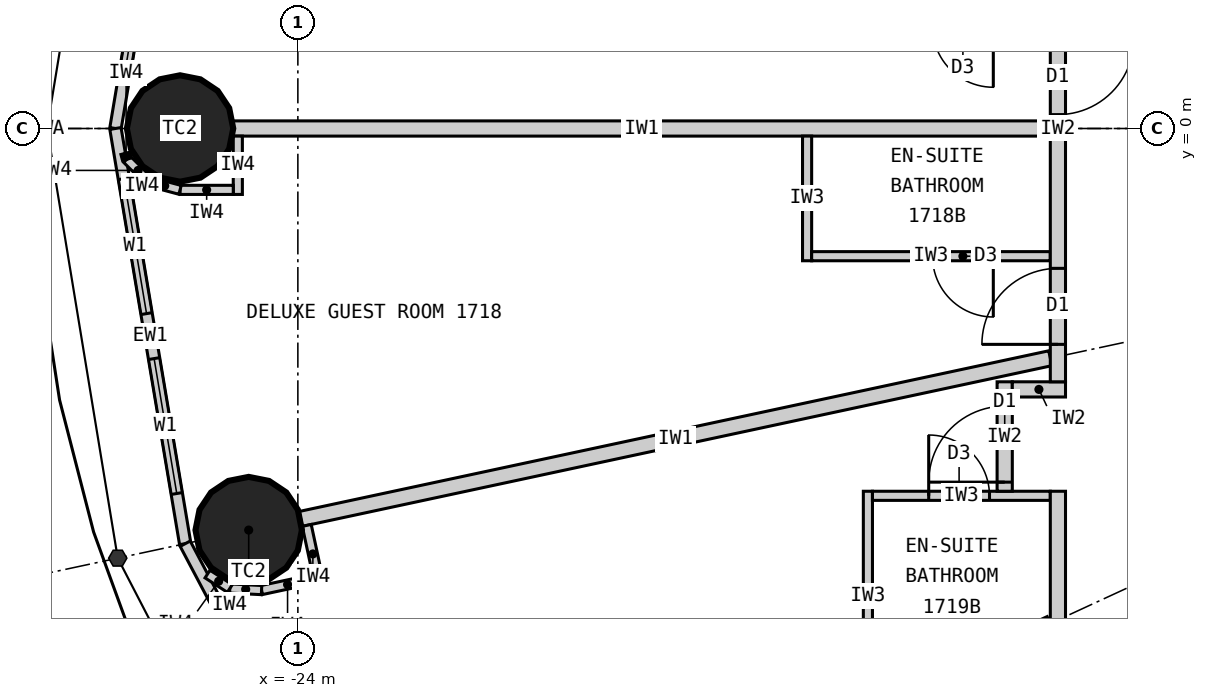
"""IFC4 building model, lengths in metres.
Left out: names, types, materials, properties, quantities, classifications, styles, units other than length and angle.
Written with IfcOpenShell. Run it as: python <this file> out.ifc"""

import sys

from ifc_helpers import new_model, si_unit, direction, frame, frame_2d, origin, origin_2d, place, context, subcontext, project, spatial, rectangle, circle, extrude, element, fill, save


model = new_model("IFC4")
c1 = context("Model", 3, precision=1e-05, world=origin(), true_north=direction((0.0, 1.0)))
c2 = subcontext(c1, "Body", "Model", "MODEL_VIEW")
j1 = project(units=[si_unit("LENGTHUNIT", "METRE"), si_unit("PLANEANGLEUNIT", "RADIAN")], contexts=[c1])
p1 = place(None, origin())
s1 = spatial("IfcSite", under=j1, at=p1, CompositionType="ELEMENT")
p2 = place(p1, origin())
s2 = spatial("IfcBuilding", under=s1, at=p2, CompositionType="ELEMENT")
p3 = place(p2, frame((0.0, 0.0, 70.5)))
s3 = spatial("IfcBuildingStorey", under=s2, at=p3, CompositionType="ELEMENT", Elevation=70.5)
for number, where, z_axis, x_axis in (
    (1, (-25.55, 0.0, 0.0), (0.0, 0.0, 1.0), (1.0, 0.0, 0.0)),
    (2, (-24.647, -5.283, 0.0), (0.0, 0.0, 1.0), (1.0, 0.0, 0.0)),
):
    element("IfcColumn", number, at=place(p3, frame(where, z_axis=z_axis, x_axis=x_axis)), inside=s3, PredefinedType="COLUMN", context=c2, shape_type="SweptSolid", body=[
        extrude(circle(Radius=0.7, at=origin_2d()), origin(), (0.0, 0.0, 1.0), 3.3),
    ])
p4 = place(p3, frame((-25.482, 5.462, 0.0), z_axis=(0.0, 0.0, 1.0), x_axis=(-0.165642551694, -0.986185857264, 0.0)))
e3 = element("IfcWall", 3, at=p4, inside=s3, PredefinedType="ELEMENTEDWALL", context=c2, shape_type="SweptSolid", body=[
    extrude(rectangle(XDim=5.539, YDim=0.15, at=frame_2d((2.77, 0.0))), origin(), (0.0, 0.0, 1.0), 3.12),
])
p5 = place(p4, frame((0.669, 0.0, 0.9)))
e4 = element("IfcOpeningElement", 4, at=p5, cuts=e3, PredefinedType="OPENING", context=c2, shape_type="SweptSolid", body=[
    extrude(rectangle(XDim=1.8, YDim=1.9, at=frame_2d((0.9, 0.95))), frame((0.0, 0.085, 0.0), z_axis=(0.0, -1.0, 0.0), x_axis=(1.0, 0.0, 0.0)), (0.0, 0.0, 1.0), 0.17),
])
p6 = place(p4, frame((3.07, 0.0, 0.9)))
e5 = element("IfcOpeningElement", 5, at=p6, cuts=e3, PredefinedType="OPENING", context=c2, shape_type="SweptSolid", body=[
    extrude(rectangle(XDim=1.8, YDim=1.9, at=frame_2d((0.9, 0.95))), frame((0.0, 0.085, 0.0), z_axis=(0.0, -1.0, 0.0), x_axis=(1.0, 0.0, 0.0)), (0.0, 0.0, 1.0), 0.17),
])
p7 = place(p3, frame((-26.4, 0.0, 0.0), z_axis=(0.0, 0.0, 1.0), x_axis=(0.165642551694, -0.986185857264, 0.0)))
e6 = element("IfcWall", 6, at=p7, inside=s3, PredefinedType="ELEMENTEDWALL", context=c2, shape_type="SweptSolid", body=[
    extrude(rectangle(XDim=5.539, YDim=0.15, at=frame_2d((2.77, 0.0))), origin(), (0.0, 0.0, 1.0), 3.12),
])
p8 = place(p7, frame((0.669, 0.0, 0.9)))
e7 = element("IfcOpeningElement", 7, at=p8, cuts=e6, PredefinedType="OPENING", context=c2, shape_type="SweptSolid", body=[
    extrude(rectangle(XDim=1.8, YDim=1.9, at=frame_2d((0.9, 0.95))), frame((0.0, 0.085, 0.0), z_axis=(0.0, -1.0, 0.0), x_axis=(1.0, 0.0, 0.0)), (0.0, 0.0, 1.0), 0.17),
])
p9 = place(p7, frame((3.07, 0.0, 0.9)))
e8 = element("IfcOpeningElement", 8, at=p9, cuts=e6, PredefinedType="OPENING", context=c2, shape_type="SweptSolid", body=[
    extrude(rectangle(XDim=1.8, YDim=1.9, at=frame_2d((0.9, 0.95))), frame((0.0, 0.085, 0.0), z_axis=(0.0, -1.0, 0.0), x_axis=(1.0, 0.0, 0.0)), (0.0, 0.0, 1.0), 0.17),
])
p10 = place(p3, frame((-25.482, -5.462, 0.0), z_axis=(0.0, 0.0, 1.0), x_axis=(0.467296867008, -0.884100468321, 0.0)))
e9 = element("IfcWall", 9, at=p10, inside=s3, PredefinedType="ELEMENTEDWALL", context=c2, shape_type="SweptSolid", body=[
    extrude(rectangle(XDim=5.734, YDim=0.15, at=frame_2d((2.867, 0.0))), origin(), (0.0, 0.0, 1.0), 3.12),
])
p11 = place(p10, frame((0.767, 0.0, 0.9)))
e10 = element("IfcOpeningElement", 10, at=p11, cuts=e9, PredefinedType="OPENING", context=c2, shape_type="SweptSolid", body=[
    extrude(rectangle(XDim=1.8, YDim=1.9, at=frame_2d((0.9, 0.95))), frame((0.0, 0.085, 0.0), z_axis=(0.0, -1.0, 0.0), x_axis=(1.0, 0.0, 0.0)), (0.0, 0.0, 1.0), 0.17),
])
p12 = place(p10, frame((3.167, 0.0, 0.9)))
e11 = element("IfcOpeningElement", 11, at=p12, cuts=e9, PredefinedType="OPENING", context=c2, shape_type="SweptSolid", body=[
    extrude(rectangle(XDim=1.8, YDim=1.9, at=frame_2d((0.9, 0.95))), frame((0.0, 0.085, 0.0), z_axis=(0.0, -1.0, 0.0), x_axis=(1.0, 0.0, 0.0)), (0.0, 0.0, 1.0), 0.17),
])
p13 = place(p3, frame((-14.1, 0.0, 0.0), z_axis=(0.0, 0.0, 1.0), x_axis=(-1.0, 0.0, 0.0)))
e12 = element("IfcWall", 12, at=p13, inside=s3, PredefinedType="PARTITIONING", context=c2, shape_type="SweptSolid", body=[
    extrude(rectangle(XDim=10.75, YDim=0.2, at=frame_2d((5.375, 0.0))), origin(), (0.0, 0.0, 1.0), 2.27),
])
p14 = place(p3, frame((-14.1, -3.022, 0.0), z_axis=(0.0, 0.0, 1.0), x_axis=(-0.977790014929, -0.209586943072, 0.0)))
e13 = element("IfcWall", 13, at=p14, inside=s3, PredefinedType="PARTITIONING", context=c2, shape_type="SweptSolid", body=[
    extrude(rectangle(XDim=10.087, YDim=0.2, at=frame_2d((5.043, 0.0))), origin(), (0.0, 0.0, 1.0), 2.32),
])
p15 = place(p3, frame((-14.1, -6.512, 0.0), z_axis=(0.0, 0.0, 1.0), x_axis=(-0.907832871056, -0.419332181247, 0.0)))
e14 = element("IfcWall", 14, at=p15, inside=s3, PredefinedType="PARTITIONING", context=c2, shape_type="SweptSolid", body=[
    extrude(rectangle(XDim=8.023, YDim=0.2, at=frame_2d((4.011, 0.0))), origin(), (0.0, 0.0, 1.0), 2.32),
])
p16 = place(p3, frame((-17.3, -0.1, 0.0), z_axis=(0.0, 0.0, 1.0), x_axis=(0.0, -1.0, 0.0)))
e15 = element("IfcWall", 15, at=p16, inside=s3, PredefinedType="PARTITIONING", context=c2, shape_type="SweptSolid", body=[
    extrude(rectangle(XDim=1.64, YDim=0.12, at=frame_2d((0.82, 0.0))), origin(), (0.0, 0.0, 1.0), 3.12),
])
p17 = place(p3, frame((-14.1, -1.68, 0.0), z_axis=(0.0, 0.0, 1.0), x_axis=(-1.0, 0.0, 0.0)))
e16 = element("IfcWall", 16, at=p17, inside=s3, PredefinedType="PARTITIONING", context=c2, shape_type="SweptSolid", body=[
    extrude(rectangle(XDim=3.14, YDim=0.12, at=frame_2d((1.57, 0.0))), origin(), (0.0, 0.0, 1.0), 3.12),
])
p18 = place(p17, frame((0.75, 0.0, 0.0)))
e17 = element("IfcOpeningElement", 17, at=p18, cuts=e16, PredefinedType="OPENING", context=c2, shape_type="SweptSolid", body=[
    extrude(rectangle(XDim=0.8, YDim=2.1, at=frame_2d((0.4, 1.05))), frame((0.0, 0.07, 0.0), z_axis=(0.0, -1.0, 0.0), x_axis=(1.0, 0.0, 0.0)), (0.0, 0.0, 1.0), 0.14),
])
p19 = place(p3, frame((-16.5, -7.521, 0.0), z_axis=(0.0, 0.0, 1.0), x_axis=(0.0, 1.0, 0.0)))
e18 = element("IfcWall", 18, at=p19, inside=s3, PredefinedType="PARTITIONING", context=c2, shape_type="SweptSolid", body=[
    extrude(rectangle(XDim=2.749, YDim=0.12, at=frame_2d((1.374, 0.0))), origin(), (0.0, 0.0, 1.0), 3.12),
])
p20 = place(p3, frame((-14.1, -4.833, 0.0), z_axis=(0.0, 0.0, 1.0), x_axis=(-1.0, 0.0, 0.0)))
e19 = element("IfcWall", 19, at=p20, inside=s3, PredefinedType="PARTITIONING", context=c2, shape_type="SweptSolid", body=[
    extrude(rectangle(XDim=2.34, YDim=0.12, at=frame_2d((1.17, 0.0))), origin(), (0.0, 0.0, 1.0), 3.12),
])
p21 = place(p20, frame((0.8, 0.0, 0.0)))
e20 = element("IfcOpeningElement", 20, at=p21, cuts=e19, PredefinedType="OPENING", context=c2, shape_type="SweptSolid", body=[
    extrude(rectangle(XDim=0.8, YDim=2.1, at=frame_2d((0.4, 1.05))), frame((0.0, 0.07, 0.0), z_axis=(0.0, -1.0, 0.0), x_axis=(1.0, 0.0, 0.0)), (0.0, 0.0, 1.0), 0.14),
])
p22 = place(p3, frame((-14.7, -3.333, 0.0), z_axis=(0.0, 0.0, 1.0), x_axis=(0.0, -1.0, 0.0)))
e21 = element("IfcWall", 21, at=p22, inside=s3, PredefinedType="PARTITIONING", context=c2, shape_type="SweptSolid", body=[
    extrude(rectangle(XDim=1.44, YDim=0.2, at=frame_2d((0.72, 0.0))), origin(), (0.0, 0.0, 1.0), 3.12),
])
p23 = place(p22, frame((0.32, 0.0, 0.0)))
e22 = element("IfcOpeningElement", 22, at=p23, cuts=e21, PredefinedType="OPENING", context=c2, shape_type="SweptSolid", body=[
    extrude(rectangle(XDim=1.0, YDim=2.2, at=frame_2d((0.5, 1.1))), frame((0.0, 0.11, 0.0), z_axis=(0.0, -1.0, 0.0), x_axis=(1.0, 0.0, 0.0)), (0.0, 0.0, 1.0), 0.22),
])
p24 = place(p3, frame((-13.9, -3.433, 0.0), z_axis=(0.0, 0.0, 1.0), x_axis=(-1.0, 0.0, 0.0)))
e23 = element("IfcWall", 23, at=p24, inside=s3, PredefinedType="PARTITIONING", context=c2, shape_type="SweptSolid", body=[
    extrude(rectangle(XDim=0.7, YDim=0.2, at=frame_2d((0.35, 0.0))), origin(), (0.0, 0.0, 1.0), 2.32),
])
p25 = place(p3, frame((-14.0, 3.333, 0.0), z_axis=(0.0, 0.0, 1.0), x_axis=(0.0, -1.0, 0.0)))
e24 = element("IfcWall", 24, at=p25, inside=s3, PredefinedType="PARTITIONING", context=c2, shape_type="SweptSolid", body=[
    extrude(rectangle(XDim=6.665, YDim=0.2, at=frame_2d((3.333, 0.0))), origin(), (0.0, 0.0, 1.0), 3.12),
])
p26 = place(p25, frame((2.15, 0.0, 0.0)))
e25 = element("IfcOpeningElement", 25, at=p26, cuts=e24, PredefinedType="OPENING", context=c2, shape_type="SweptSolid", body=[
    extrude(rectangle(XDim=1.0, YDim=2.2, at=frame_2d((0.5, 1.1))), frame((0.0, 0.11, 0.0), z_axis=(0.0, -1.0, 0.0), x_axis=(1.0, 0.0, 0.0)), (0.0, 0.0, 1.0), 0.22),
])
p27 = place(p25, frame((5.173, 0.0, 0.0)))
e26 = element("IfcOpeningElement", 26, at=p27, cuts=e24, PredefinedType="OPENING", context=c2, shape_type="SweptSolid", body=[
    extrude(rectangle(XDim=1.0, YDim=2.2, at=frame_2d((0.5, 1.1))), frame((0.0, 0.11, 0.0), z_axis=(0.0, -1.0, 0.0), x_axis=(1.0, 0.0, 0.0)), (0.0, 0.0, 1.0), 0.22),
])
p28 = place(p3, frame((-14.0, -4.772, 0.0), z_axis=(0.0, 0.0, 1.0), x_axis=(0.0, -1.0, 0.0)))
e27 = element("IfcWall", 27, at=p28, inside=s3, PredefinedType="PARTITIONING", context=c2, shape_type="SweptSolid", body=[
    extrude(rectangle(XDim=5.127, YDim=0.2, at=frame_2d((2.564, 0.0))), origin(), (0.0, 0.0, 1.0), 3.12),
])
p29 = place(p28, frame((4.025, 0.0, 0.0)))
e28 = element("IfcOpeningElement", 28, at=p29, cuts=e27, PredefinedType="OPENING", context=c2, shape_type="SweptSolid", body=[
    extrude(rectangle(XDim=1.0, YDim=2.2, at=frame_2d((0.5, 1.1))), frame((0.0, 0.11, 0.0), z_axis=(0.0, -1.0, 0.0), x_axis=(1.0, 0.0, 0.0)), (0.0, 0.0, 1.0), 0.22),
])
p30 = place(p3, frame((-24.79, -0.1, 0.0), z_axis=(0.0, 0.0, 1.0), x_axis=(0.0, -1.0, 0.0)))
e29 = element("IfcWall", 29, at=p30, inside=s3, PredefinedType="PARTITIONING", context=c2, shape_type="SweptSolid", body=[
    extrude(rectangle(XDim=0.767, YDim=0.12, at=frame_2d((0.384, 0.0))), origin(), (0.0, 0.0, 1.0), 3.12),
])
p31 = place(p3, frame((-24.85, -0.808, 0.0), z_axis=(0.0, 0.0, 1.0), x_axis=(-1.0, 0.0, 0.0)))
e30 = element("IfcWall", 30, at=p31, inside=s3, PredefinedType="PARTITIONING", context=c2, shape_type="SweptSolid", body=[
    extrude(rectangle(XDim=0.7, YDim=0.12, at=frame_2d((0.35, 0.0))), origin(), (0.0, 0.0, 1.0), 3.12),
])
p32 = place(p3, frame((-25.55, -0.808, 0.0), z_axis=(0.0, 0.0, 1.0), x_axis=(-0.965807183573, 0.2592614205, 0.0)))
e31 = element("IfcWall", 31, at=p32, inside=s3, PredefinedType="PARTITIONING", context=c2, shape_type="SweptSolid", body=[
    extrude(rectangle(XDim=0.418, YDim=0.12, at=frame_2d((0.209, 0.0))), origin(), (0.0, 0.0, 1.0), 3.12),
])
p33 = place(p3, frame((-25.954, -0.699, 0.0), z_axis=(0.0, 0.0, 1.0), x_axis=(-0.707106781187, 0.707106781187, 0.0)))
e32 = element("IfcWall", 32, at=p33, inside=s3, PredefinedType="PARTITIONING", context=c2, shape_type="SweptSolid", body=[
    extrude(rectangle(XDim=0.418, YDim=0.12, at=frame_2d((0.209, 0.0))), origin(), (0.0, 0.0, 1.0), 3.12),
])
p34 = place(p3, frame((-26.249, -0.404, 0.0), z_axis=(0.0, 0.0, 1.0), x_axis=(-0.259754282609, 0.965674744759, 0.0)))
e33 = element("IfcWall", 33, at=p34, inside=s3, PredefinedType="PARTITIONING", context=c2, shape_type="SweptSolid", body=[
    extrude(rectangle(XDim=0.08, YDim=0.12, at=frame_2d((0.04, 0.0))), origin(), (0.0, 0.0, 1.0), 3.12),
])
p35 = place(p3, frame((-23.883, -5.222, 0.0), z_axis=(0.0, 0.0, 1.0), x_axis=(0.209311842415, -0.977848941619, 0.0)))
e34 = element("IfcWall", 34, at=p35, inside=s3, PredefinedType="PARTITIONING", context=c2, shape_type="SweptSolid", body=[
    extrude(rectangle(XDim=0.768, YDim=0.12, at=frame_2d((0.384, 0.0))), origin(), (0.0, 0.0, 1.0), 3.12),
])
p36 = place(p3, frame((-23.793, -5.926, 0.0), z_axis=(0.0, 0.0, 1.0), x_axis=(-0.977792206673, -0.209576717621, 0.0)))
e35 = element("IfcWall", 35, at=p36, inside=s3, PredefinedType="PARTITIONING", context=c2, shape_type="SweptSolid", body=[
    extrude(rectangle(XDim=0.7, YDim=0.12, at=frame_2d((0.35, 0.0))), origin(), (0.0, 0.0, 1.0), 3.12),
])
p37 = place(p3, frame((-24.478, -6.073, 0.0), z_axis=(0.0, 0.0, 1.0), x_axis=(-0.998708262812, 0.05081147302, 0.0)))
e36 = element("IfcWall", 36, at=p37, inside=s3, PredefinedType="PARTITIONING", context=c2, shape_type="SweptSolid", body=[
    extrude(rectangle(XDim=0.418, YDim=0.12, at=frame_2d((0.209, 0.0))), origin(), (0.0, 0.0, 1.0), 3.12),
])
p38 = place(p3, frame((-24.895, -6.052, 0.0), z_axis=(0.0, 0.0, 1.0), x_axis=(-0.839495197275, 0.54336710772, 0.0)))
e37 = element("IfcWall", 37, at=p38, inside=s3, PredefinedType="PARTITIONING", context=c2, shape_type="SweptSolid", body=[
    extrude(rectangle(XDim=0.35, YDim=0.12, at=frame_2d((0.175, 0.0))), origin(), (0.0, 0.0, 1.0), 3.12),
])
p39 = place(p6, origin())
e38 = element("IfcWindow", 38, at=p39, inside=s3, PartitioningType="SINGLE_PANEL", PredefinedType="WINDOW", context=c2, shape_type="SweptSolid", body=[
    extrude(rectangle(XDim=1.8, YDim=1.9, at=frame_2d((0.9, 0.95))), frame((0.0, 0.03, 0.0), z_axis=(0.0, -1.0, 0.0), x_axis=(1.0, 0.0, 0.0)), (0.0, 0.0, 1.0), 0.06),
])
fill(e5, e38)
p40 = place(p8, origin())
e39 = element("IfcWindow", 39, at=p40, inside=s3, PartitioningType="SINGLE_PANEL", PredefinedType="WINDOW", context=c2, shape_type="SweptSolid", body=[
    extrude(rectangle(XDim=1.8, YDim=1.9, at=frame_2d((0.9, 0.95))), frame((0.0, 0.03, 0.0), z_axis=(0.0, -1.0, 0.0), x_axis=(1.0, 0.0, 0.0)), (0.0, 0.0, 1.0), 0.06),
])
fill(e7, e39)
p41 = place(p9, origin())
e40 = element("IfcWindow", 40, at=p41, inside=s3, PartitioningType="SINGLE_PANEL", PredefinedType="WINDOW", context=c2, shape_type="SweptSolid", body=[
    extrude(rectangle(XDim=1.8, YDim=1.9, at=frame_2d((0.9, 0.95))), frame((0.0, 0.03, 0.0), z_axis=(0.0, -1.0, 0.0), x_axis=(1.0, 0.0, 0.0)), (0.0, 0.0, 1.0), 0.06),
])
fill(e8, e40)
p42 = place(p11, origin())
e41 = element("IfcWindow", 41, at=p42, inside=s3, PartitioningType="SINGLE_PANEL", PredefinedType="WINDOW", context=c2, shape_type="SweptSolid", body=[
    extrude(rectangle(XDim=1.8, YDim=1.9, at=frame_2d((0.9, 0.95))), frame((0.0, 0.03, 0.0), z_axis=(0.0, -1.0, 0.0), x_axis=(1.0, 0.0, 0.0)), (0.0, 0.0, 1.0), 0.06),
])
fill(e10, e41)
p43 = place(p26, origin())
e42 = element("IfcDoor", 42, at=p43, inside=s3, OperationType="SINGLE_SWING_LEFT", PredefinedType="DOOR", context=c2, shape_type="SweptSolid", body=[
    extrude(rectangle(XDim=1.0, YDim=2.2, at=frame_2d((0.5, 1.1))), frame((0.0, 0.025, 0.0), z_axis=(0.0, -1.0, 0.0), x_axis=(1.0, 0.0, 0.0)), (0.0, 0.0, 1.0), 0.05),
])
fill(e25, e42)
p44 = place(p18, origin())
e43 = element("IfcDoor", 43, at=p44, inside=s3, OperationType="SINGLE_SWING_LEFT", PredefinedType="DOOR", context=c2, shape_type="SweptSolid", body=[
    extrude(rectangle(XDim=0.8, YDim=2.1, at=frame_2d((0.4, 1.05))), frame((0.0, 0.025, 0.0), z_axis=(0.0, -1.0, 0.0), x_axis=(1.0, 0.0, 0.0)), (0.0, 0.0, 1.0), 0.05),
])
fill(e17, e43)
p45 = place(p27, origin())
e44 = element("IfcDoor", 44, at=p45, inside=s3, OperationType="SINGLE_SWING_RIGHT", PredefinedType="DOOR", context=c2, shape_type="SweptSolid", body=[
    extrude(rectangle(XDim=1.0, YDim=2.2, at=frame_2d((0.5, 1.1))), frame((0.0, 0.025, 0.0), z_axis=(0.0, -1.0, 0.0), x_axis=(1.0, 0.0, 0.0)), (0.0, 0.0, 1.0), 0.05),
])
fill(e26, e44)
p46 = place(p21, origin())
e45 = element("IfcDoor", 45, at=p46, inside=s3, OperationType="SINGLE_SWING_RIGHT", PredefinedType="DOOR", context=c2, shape_type="SweptSolid", body=[
    extrude(rectangle(XDim=0.8, YDim=2.1, at=frame_2d((0.4, 1.05))), frame((0.0, 0.025, 0.0), z_axis=(0.0, -1.0, 0.0), x_axis=(1.0, 0.0, 0.0)), (0.0, 0.0, 1.0), 0.05),
])
fill(e20, e45)
p47 = place(p23, origin())
e46 = element("IfcDoor", 46, at=p47, inside=s3, OperationType="SINGLE_SWING_RIGHT", PredefinedType="DOOR", context=c2, shape_type="SweptSolid", body=[
    extrude(rectangle(XDim=1.0, YDim=2.2, at=frame_2d((0.5, 1.1))), frame((0.0, 0.025, 0.0), z_axis=(0.0, -1.0, 0.0), x_axis=(1.0, 0.0, 0.0)), (0.0, 0.0, 1.0), 0.05),
])
fill(e22, e46)
save(model, sys.argv[1])
